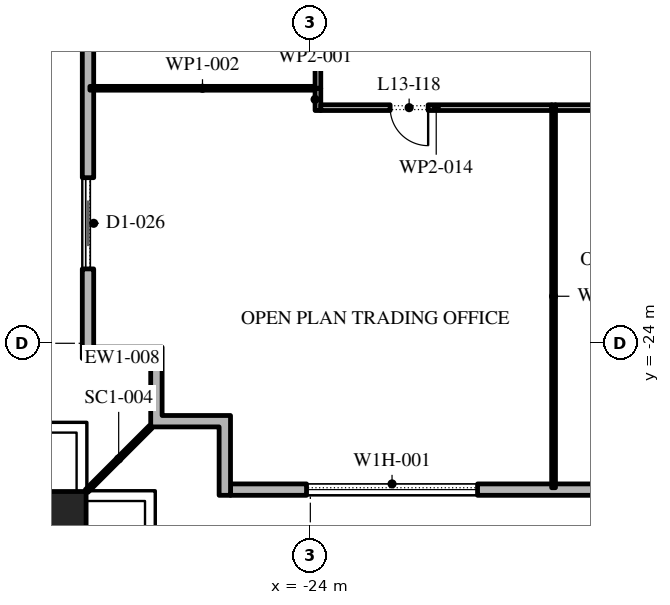
"""IFC4 building model, lengths in metres.
Left out: names, types, materials, properties, quantities, classifications, styles, units other than length and angle.
Written with IfcOpenShell. Run it as: python <this file> out.ifc"""

import sys

from ifc_helpers import new_model, si_unit, direction, frame, frame_2d, origin, origin_2d, place, context, subcontext, project, spatial, polyline, rectangle, outline, extrude, element, fill, save


model = new_model("IFC4")
c1 = context("Model", 3, precision=1e-05, world=origin(), true_north=direction((0.0, 1.0)))
c2 = subcontext(c1, "Body", "Model", "MODEL_VIEW")
j1 = project(units=[si_unit("LENGTHUNIT", "METRE"), si_unit("PLANEANGLEUNIT", "RADIAN")], contexts=[c1])
p1 = place(None, origin())
s1 = spatial("IfcSite", under=j1, at=p1, CompositionType="ELEMENT")
p2 = place(p1, origin())
s2 = spatial("IfcBuilding", under=s1, at=p2, CompositionType="ELEMENT")
p3 = place(p2, frame((0.0, 0.0, 64.8)))
s3 = spatial("IfcBuildingStorey", under=s2, at=p3, CompositionType="ELEMENT", Elevation=64.8)
p4 = place(p3, frame((-30.6, -28.6, 0.0), z_axis=(0.0, 0.0, 1.0), x_axis=(1.0, 0.0, 0.0)))
e1 = element("IfcColumn", 1, at=p4, inside=s3, PredefinedType="COLUMN", context=c2, shape_type="SweptSolid", body=[
    extrude(rectangle(XDim=1.4, YDim=1.4, at=origin_2d()), origin(), (0.0, 0.0, 1.0), 4.2),
])
p5 = place(p3, frame((-26.1, -27.85, 0.0), z_axis=(0.0, 0.0, 1.0), x_axis=(1.0, 0.0, 0.0)))
e2 = element("IfcWall", 2, at=p5, inside=s3, PredefinedType="STANDARD", context=c2, shape_type="SweptSolid", body=[
    extrude(rectangle(XDim=52.5, YDim=0.3, at=frame_2d((26.25, 0.0))), origin(), (0.0, 0.0, 1.0), 4.0),
])
p6 = place(p5, frame((2.0, 0.0, 0.45)))
e3 = element("IfcOpeningElement", 3, at=p6, cuts=e2, PredefinedType="OPENING", context=c2, shape_type="SweptSolid", body=[
    extrude(rectangle(XDim=4.5, YDim=2.75, at=frame_2d((2.25, 1.375))), frame((0.0, 0.16, 0.0), z_axis=(0.0, -1.0, 0.0), x_axis=(1.0, 0.0, 0.0)), (0.0, 0.0, 1.0), 0.32),
])
p7 = place(p5, frame((10.65, 0.0, 0.45)))
e4 = element("IfcOpeningElement", 4, at=p7, cuts=e2, PredefinedType="OPENING", context=c2, shape_type="SweptSolid", body=[
    extrude(rectangle(XDim=4.5, YDim=2.75, at=frame_2d((2.25, 1.375))), frame((0.0, 0.16, 0.0), z_axis=(0.0, -1.0, 0.0), x_axis=(1.0, 0.0, 0.0)), (0.0, 0.0, 1.0), 0.32),
])
p8 = place(p5, frame((20.5, 0.0, 0.0)))
e5 = element("IfcOpeningElement", 5, at=p8, cuts=e2, PredefinedType="OPENING", context=c2, shape_type="SweptSolid", body=[
    extrude(rectangle(XDim=2.4, YDim=3.5, at=frame_2d((1.2, 1.75))), frame((0.0, 0.16, 0.0), z_axis=(0.0, -1.0, 0.0), x_axis=(1.0, 0.0, 0.0)), (0.0, 0.0, 1.0), 0.32),
])
p9 = place(p5, frame((28.25, 0.0, 0.45)))
e6 = element("IfcOpeningElement", 6, at=p9, cuts=e2, PredefinedType="OPENING", context=c2, shape_type="SweptSolid", body=[
    extrude(rectangle(XDim=4.5, YDim=2.75, at=frame_2d((2.25, 1.375))), frame((0.0, 0.16, 0.0), z_axis=(0.0, -1.0, 0.0), x_axis=(1.0, 0.0, 0.0)), (0.0, 0.0, 1.0), 0.32),
])
p10 = place(p5, frame((37.05, 0.0, 0.45)))
e7 = element("IfcOpeningElement", 7, at=p10, cuts=e2, PredefinedType="OPENING", context=c2, shape_type="SweptSolid", body=[
    extrude(rectangle(XDim=4.5, YDim=2.75, at=frame_2d((2.25, 1.375))), frame((0.0, 0.16, 0.0), z_axis=(0.0, -1.0, 0.0), x_axis=(1.0, 0.0, 0.0)), (0.0, 0.0, 1.0), 0.32),
])
p11 = place(p5, frame((45.85, 0.0, 0.45)))
e8 = element("IfcOpeningElement", 8, at=p11, cuts=e2, PredefinedType="OPENING", context=c2, shape_type="SweptSolid", body=[
    extrude(rectangle(XDim=4.5, YDim=2.75, at=frame_2d((2.25, 1.375))), frame((0.0, 0.16, 0.0), z_axis=(0.0, -1.0, 0.0), x_axis=(1.0, 0.0, 0.0)), (0.0, 0.0, 1.0), 0.32),
])
p12 = place(p3, frame((-29.85, 25.1, 0.0), z_axis=(0.0, 0.0, 1.0), x_axis=(0.0, -1.0, 0.0)))
e9 = element("IfcWall", 9, at=p12, inside=s3, PredefinedType="STANDARD", context=c2, shape_type="SweptSolid", body=[
    extrude(rectangle(XDim=49.5, YDim=0.3, at=frame_2d((24.75, 0.0))), origin(), (0.0, 0.0, 1.0), 4.0),
])
p13 = place(p12, frame((1.157, 0.0, 0.45)))
e10 = element("IfcOpeningElement", 10, at=p13, cuts=e9, PredefinedType="OPENING", context=c2, shape_type="SweptSolid", body=[
    extrude(rectangle(XDim=4.5, YDim=2.875, at=frame_2d((2.25, 1.438))), frame((0.0, 0.16, 0.0), z_axis=(0.0, -1.0, 0.0), x_axis=(1.0, 0.0, 0.0)), (0.0, 0.0, 1.0), 0.32),
])
p14 = place(p12, frame((8.121, 0.0, 0.45)))
e11 = element("IfcOpeningElement", 11, at=p14, cuts=e9, PredefinedType="OPENING", context=c2, shape_type="SweptSolid", body=[
    extrude(rectangle(XDim=4.5, YDim=3.05, at=frame_2d((2.25, 1.525))), frame((0.0, 0.16, 0.0), z_axis=(0.0, -1.0, 0.0), x_axis=(1.0, 0.0, 0.0)), (0.0, 0.0, 1.0), 0.32),
])
p15 = place(p12, frame((16.286, 0.0, 0.0)))
e12 = element("IfcOpeningElement", 12, at=p15, cuts=e9, PredefinedType="OPENING", context=c2, shape_type="SweptSolid", body=[
    extrude(rectangle(XDim=2.4, YDim=3.325, at=frame_2d((1.2, 1.663))), frame((0.0, 0.16, 0.0), z_axis=(0.0, -1.0, 0.0), x_axis=(1.0, 0.0, 0.0)), (0.0, 0.0, 1.0), 0.32),
])
p16 = place(p12, frame((22.35, 0.0, 0.45)))
e13 = element("IfcOpeningElement", 13, at=p16, cuts=e9, PredefinedType="OPENING", context=c2, shape_type="SweptSolid", body=[
    extrude(rectangle(XDim=4.5, YDim=2.875, at=frame_2d((2.25, 1.438))), frame((0.0, 0.16, 0.0), z_axis=(0.0, -1.0, 0.0), x_axis=(1.0, 0.0, 0.0)), (0.0, 0.0, 1.0), 0.32),
])
p17 = place(p12, frame((29.464, 0.0, 0.45)))
e14 = element("IfcOpeningElement", 14, at=p17, cuts=e9, PredefinedType="OPENING", context=c2, shape_type="SweptSolid", body=[
    extrude(rectangle(XDim=4.5, YDim=2.875, at=frame_2d((2.25, 1.438))), frame((0.0, 0.16, 0.0), z_axis=(0.0, -1.0, 0.0), x_axis=(1.0, 0.0, 0.0)), (0.0, 0.0, 1.0), 0.32),
])
p18 = place(p12, frame((36.579, 0.0, 0.45)))
e15 = element("IfcOpeningElement", 15, at=p18, cuts=e9, PredefinedType="OPENING", context=c2, shape_type="SweptSolid", body=[
    extrude(rectangle(XDim=4.5, YDim=2.825, at=frame_2d((2.25, 1.413))), frame((0.0, 0.16, 0.0), z_axis=(0.0, -1.0, 0.0), x_axis=(1.0, 0.0, 0.0)), (0.0, 0.0, 1.0), 0.32),
])
p19 = place(p12, frame((44.743, 0.0, 0.0)))
e16 = element("IfcOpeningElement", 16, at=p19, cuts=e9, PredefinedType="OPENING", context=c2, shape_type="SweptSolid", body=[
    extrude(rectangle(XDim=2.4, YDim=3.5, at=frame_2d((1.2, 1.75))), frame((0.0, 0.16, 0.0), z_axis=(0.0, -1.0, 0.0), x_axis=(1.0, 0.0, 0.0)), (0.0, 0.0, 1.0), 0.32),
])
p20 = place(p3, origin())
e17 = element("IfcWall", 17, at=p20, inside=s3, PredefinedType="STANDARD", context=c2, shape_type="SweptSolid", body=[
    extrude(outline(polyline([(-26.4, -26.2), (-28.2, -26.2), (-28.2, -24.4), (-29.7, -24.4), (-29.7, -24.1), (-27.9, -24.1), (-27.9, -25.9), (-26.1, -25.9), (-26.1, -28.0), (-26.4, -28.0), (-26.4, -26.2)])), origin(), (0.0, 0.0, 1.0), 4.0),
])
p21 = place(p3, frame((-28.2, -26.2, -0.05), z_axis=(0.0, 0.0, 1.0), x_axis=(-0.707106781187, -0.707106781187, 0.0)))
e18 = element("IfcWall", 18, at=p21, inside=s3, PredefinedType="STANDARD", context=c2, shape_type="SweptSolid", body=[
    extrude(rectangle(XDim=2.385, YDim=0.1, at=frame_2d((1.192, 0.0))), origin(), (0.0, 0.0, 1.0), 4.05),
])
p22 = place(p3, frame((-23.8, -17.875, 0.0), z_axis=(0.0, 0.0, 1.0), x_axis=(0.0, 1.0, 0.0)))
e19 = element("IfcWall", 19, at=p22, inside=s3, PredefinedType="PARTITIONING", context=c2, shape_type="SweptSolid", body=[
    extrude(rectangle(XDim=0.585, YDim=0.15, at=frame_2d((0.292, 0.0))), origin(), (0.0, 0.0, 1.0), 4.0),
])
p23 = place(p3, frame((-23.875, -17.29, 0.0), z_axis=(0.0, 0.0, 1.0), x_axis=(-1.0, 0.0, 0.0)))
e20 = element("IfcWall", 20, at=p23, inside=s3, PredefinedType="PARTITIONING", context=c2, shape_type="SweptSolid", body=[
    extrude(rectangle(XDim=5.925, YDim=0.1, at=frame_2d((2.962, 0.0))), origin(), (0.0, 0.0, 1.0), 4.0),
])
p24 = place(p3, frame((-23.8, -17.29, 0.0), z_axis=(0.0, 0.0, 1.0), x_axis=(0.0, 1.0, 0.0)))
e21 = element("IfcWall", 21, at=p24, inside=s3, PredefinedType="PARTITIONING", context=c2, shape_type="SweptSolid", body=[
    extrude(rectangle(XDim=7.17, YDim=0.15, at=frame_2d((3.585, 0.0))), origin(), (0.0, 0.0, 1.0), 4.0),
])
p25 = place(p24, frame((2.47, 0.0, 0.0)))
e22 = element("IfcOpeningElement", 22, at=p25, cuts=e21, PredefinedType="OPENING", context=c2, shape_type="SweptSolid", body=[
    extrude(rectangle(XDim=1.0, YDim=2.1, at=frame_2d((0.5, 1.05))), frame((0.0, 0.085, 0.0), z_axis=(0.0, -1.0, 0.0), x_axis=(1.0, 0.0, 0.0)), (0.0, 0.0, 1.0), 0.17),
])
p26 = place(p3, frame((-17.6, -27.8, 0.0), z_axis=(0.0, 0.0, 1.0), x_axis=(0.0, 1.0, 0.0)))
e23 = element("IfcWall", 23, at=p26, inside=s3, PredefinedType="PARTITIONING", context=c2, shape_type="SweptSolid", body=[
    extrude(rectangle(XDim=10.075, YDim=0.1, at=frame_2d((5.038, 0.0))), origin(), (0.0, 0.0, 1.0), 4.0),
])
p27 = place(p3, frame((-17.65, -17.8, 0.0), z_axis=(0.0, 0.0, 1.0), x_axis=(-1.0, 0.0, 0.0)))
e24 = element("IfcWall", 24, at=p27, inside=s3, PredefinedType="PARTITIONING", context=c2, shape_type="SweptSolid", body=[
    extrude(rectangle(XDim=6.075, YDim=0.15, at=frame_2d((3.038, 0.0))), origin(), (0.0, 0.0, 1.0), 4.0),
])
p28 = place(p27, frame((3.25, 0.0, 0.0)))
e25 = element("IfcOpeningElement", 25, at=p28, cuts=e24, PredefinedType="OPENING", context=c2, shape_type="SweptSolid", body=[
    extrude(rectangle(XDim=1.0, YDim=2.1, at=frame_2d((0.5, 1.05))), frame((0.0, 0.085, 0.0), z_axis=(0.0, -1.0, 0.0), x_axis=(1.0, 0.0, 0.0)), (0.0, 0.0, 1.0), 0.17),
])
p29 = place(p3, frame((-8.85, -17.8, 0.0), z_axis=(0.0, 0.0, 1.0), x_axis=(-1.0, 0.0, 0.0)))
e26 = element("IfcWall", 26, at=p29, inside=s3, PredefinedType="PARTITIONING", context=c2, shape_type="SweptSolid", body=[
    extrude(rectangle(XDim=8.7, YDim=0.15, at=frame_2d((4.35, 0.0))), origin(), (0.0, 0.0, 1.0), 4.0),
])
p30 = place(p29, frame((4.85, 0.0, 0.0)))
e27 = element("IfcOpeningElement", 27, at=p30, cuts=e26, PredefinedType="OPENING", context=c2, shape_type="SweptSolid", body=[
    extrude(rectangle(XDim=1.0, YDim=2.1, at=frame_2d((0.5, 1.05))), frame((0.0, 0.085, 0.0), z_axis=(0.0, -1.0, 0.0), x_axis=(1.0, 0.0, 0.0)), (0.0, 0.0, 1.0), 0.17),
])
p31 = place(p6, origin())
e28 = element("IfcWindow", 28, at=p31, inside=s3, PartitioningType="DOUBLE_PANEL_VERTICAL", PredefinedType="WINDOW", context=c2, shape_type="SweptSolid", body=[
    extrude(rectangle(XDim=4.5, YDim=2.75, at=frame_2d((2.25, 1.375))), frame((0.0, 0.03, 0.0), z_axis=(0.0, -1.0, 0.0), x_axis=(1.0, 0.0, 0.0)), (0.0, 0.0, 1.0), 0.06),
])
fill(e3, e28)
p32 = place(p19, origin())
e29 = element("IfcDoor", 29, at=p32, inside=s3, OperationType="DOUBLE_DOOR_SLIDING", PredefinedType="DOOR", context=c2, shape_type="SweptSolid", body=[
    extrude(rectangle(XDim=2.4, YDim=3.5, at=frame_2d((1.2, 1.75))), frame((0.0, 0.025, 0.0), z_axis=(0.0, -1.0, 0.0), x_axis=(1.0, 0.0, 0.0)), (0.0, 0.0, 1.0), 0.05),
])
fill(e16, e29)
p33 = place(p28, origin())
e30 = element("IfcDoor", 30, at=p33, inside=s3, OperationType="SINGLE_SWING_RIGHT", PredefinedType="DOOR", context=c2, shape_type="SweptSolid", body=[
    extrude(rectangle(XDim=1.0, YDim=2.1, at=frame_2d((0.5, 1.05))), frame((0.0, 0.025, 0.0), z_axis=(0.0, -1.0, 0.0), x_axis=(1.0, 0.0, 0.0)), (0.0, 0.0, 1.0), 0.05),
])
fill(e25, e30)
save(model, sys.argv[1])
